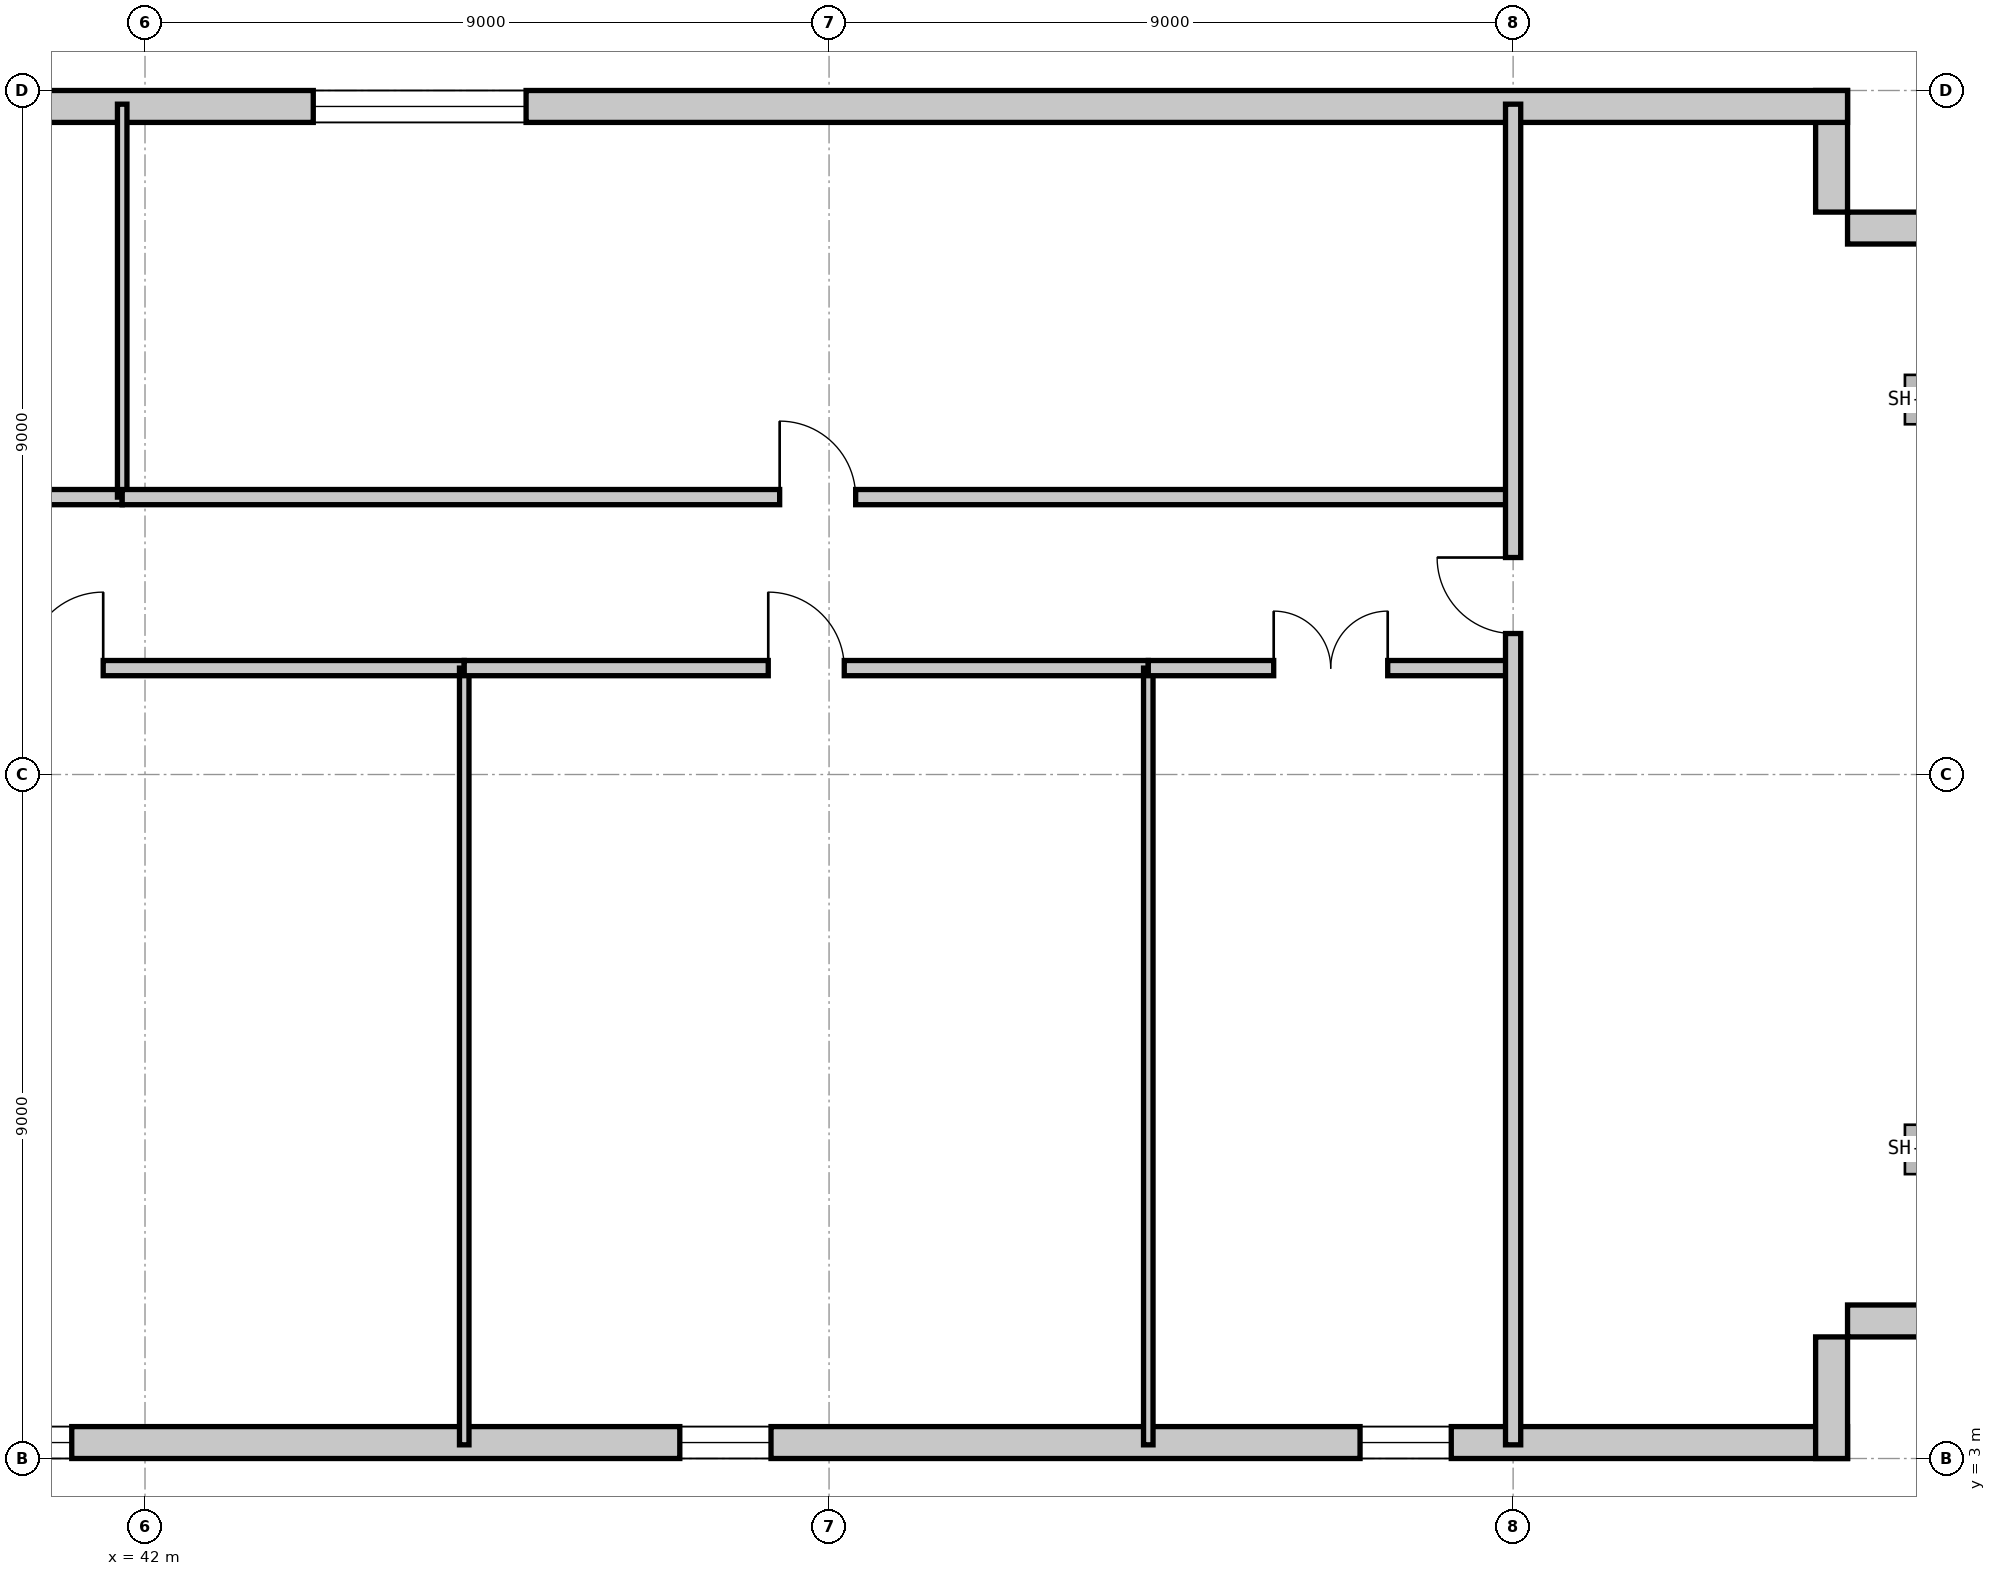
"""IFC4 building model, lengths in metres.
Left out: names, types, materials, properties, quantities, classifications, styles, units other than length and angle.
Written with IfcOpenShell. Run it as: python <this file> out.ifc"""

import sys

from ifc_helpers import new_model, si_unit, direction, frame, frame_2d, origin, origin_2d, place, context, subcontext, project, spatial, rectangle, extrude, element, fill, save


model = new_model("IFC4")
c1 = context("Model", 3, precision=1e-05, world=origin(), true_north=direction((0.0, 1.0)))
c2 = subcontext(c1, "Body", "Model", "MODEL_VIEW")
j1 = project(units=[si_unit("LENGTHUNIT", "METRE"), si_unit("PLANEANGLEUNIT", "RADIAN")], contexts=[c1])
p1 = place(None, origin())
s1 = spatial("IfcSite", under=j1, at=p1, CompositionType="ELEMENT")
p2 = place(p1, origin())
s2 = spatial("IfcBuilding", under=s1, at=p2, CompositionType="ELEMENT")
p3 = place(p2, frame((0.0, 0.0, 38.4)))
s3 = spatial("IfcBuildingStorey", under=s2, at=p3, CompositionType="ELEMENT", Elevation=38.4)
for number, where, z_axis, x_axis in (
    (1, (42.0, 3.0, 0.0), (0.0, 0.0, 1.0), (1.0, 0.0, 0.0)),
    (2, (42.0, 21.0, 0.0), (0.0, 0.0, 1.0), (1.0, 0.0, 0.0)),
    (3, (48.0, 3.0, 0.0), (0.0, 0.0, 1.0), (1.0, 0.0, 0.0)),
    (4, (48.0, 21.0, 0.0), (0.0, 0.0, 1.0), (1.0, 0.0, 0.0)),
    (5, (51.0, 3.0, 0.0), (0.0, 0.0, 1.0), (1.0, 0.0, 0.0)),
    (6, (51.0, 21.0, 0.0), (0.0, 0.0, 1.0), (1.0, 0.0, 0.0)),
    (7, (54.0, 3.0, 0.0), (0.0, 0.0, 1.0), (1.0, 0.0, 0.0)),
    (8, (54.0, 21.0, 0.0), (0.0, 0.0, 1.0), (1.0, 0.0, 0.0)),
    (9, (57.0, 3.0, 0.0), (0.0, 0.0, 1.0), (1.0, 0.0, 0.0)),
    (10, (57.0, 21.0, 0.0), (0.0, 0.0, 1.0), (1.0, 0.0, 0.0)),
    (11, (60.5, 3.0, 0.0), (0.0, 0.0, 1.0), (1.0, 0.0, 0.0)),
    (12, (60.5, 21.0, 0.0), (0.0, 0.0, 1.0), (1.0, 0.0, 0.0)),
    (13, (63.5, 3.0, 0.0), (0.0, 0.0, 1.0), (1.0, 0.0, 0.0)),
    (14, (63.5, 21.0, 0.0), (0.0, 0.0, 1.0), (1.0, 0.0, 0.0)),
):
    element("IfcColumn", number, at=place(p3, frame(where, z_axis=z_axis, x_axis=x_axis)), inside=s3, PredefinedType="COLUMN", context=c2, shape_type="SweptSolid", body=[
        extrude(rectangle(XDim=1.2, YDim=1.2, at=origin_2d()), origin(), (0.0, 0.0, 1.0), 4.2),
    ])
p4 = place(p3, frame((23.9, 3.21, 0.0), z_axis=(0.0, 0.0, 1.0), x_axis=(1.0, 0.0, 0.0)))
e15 = element("IfcWall", 15, at=p4, inside=s3, PredefinedType="STANDARD", context=c2, shape_type="SweptSolid", body=[
    extrude(rectangle(XDim=40.5, YDim=0.42, at=frame_2d((20.25, 0.0))), origin(), (0.0, 0.0, 1.0), 3.98),
])
p5 = place(p4, frame((1.1, 0.0, 0.85)))
e16 = element("IfcOpeningElement", 16, at=p5, cuts=e15, PredefinedType="OPENING", context=c2, shape_type="SweptSolid", body=[
    extrude(rectangle(XDim=1.2, YDim=2.45, at=frame_2d((0.6, 1.225))), frame((0.0, 0.22, 0.0), z_axis=(0.0, -1.0, 0.0), x_axis=(1.0, 0.0, 0.0)), (0.0, 0.0, 1.0), 0.44),
])
p6 = place(p4, frame((5.336, 0.0, 0.85)))
e17 = element("IfcOpeningElement", 17, at=p6, cuts=e15, PredefinedType="OPENING", context=c2, shape_type="SweptSolid", body=[
    extrude(rectangle(XDim=2.8, YDim=2.45, at=frame_2d((1.4, 1.225))), frame((0.0, 0.22, 0.0), z_axis=(0.0, -1.0, 0.0), x_axis=(1.0, 0.0, 0.0)), (0.0, 0.0, 1.0), 0.44),
])
p7 = place(p4, frame((14.336, 0.0, 0.85)))
e18 = element("IfcOpeningElement", 18, at=p7, cuts=e15, PredefinedType="OPENING", context=c2, shape_type="SweptSolid", body=[
    extrude(rectangle(XDim=2.8, YDim=2.45, at=frame_2d((1.4, 1.225))), frame((0.0, 0.22, 0.0), z_axis=(0.0, -1.0, 0.0), x_axis=(1.0, 0.0, 0.0)), (0.0, 0.0, 1.0), 0.44),
])
p8 = place(p4, frame((25.136, 0.0, 0.85)))
e19 = element("IfcOpeningElement", 19, at=p8, cuts=e15, PredefinedType="OPENING", context=c2, shape_type="SweptSolid", body=[
    extrude(rectangle(XDim=1.2, YDim=2.45, at=frame_2d((0.6, 1.225))), frame((0.0, 0.22, 0.0), z_axis=(0.0, -1.0, 0.0), x_axis=(1.0, 0.0, 0.0)), (0.0, 0.0, 1.0), 0.44),
])
p9 = place(p4, frame((34.086, 0.0, 0.85)))
e20 = element("IfcOpeningElement", 20, at=p9, cuts=e15, PredefinedType="OPENING", context=c2, shape_type="SweptSolid", body=[
    extrude(rectangle(XDim=1.2, YDim=2.45, at=frame_2d((0.6, 1.225))), frame((0.0, 0.22, 0.0), z_axis=(0.0, -1.0, 0.0), x_axis=(1.0, 0.0, 0.0)), (0.0, 0.0, 1.0), 0.44),
])
for number, where, z_axis, x_axis in (
    (21, (64.19, 3.0, 0.0), (0.0, 0.0, 1.0), (0.0, 1.0, 0.0)),
    (22, (64.4, 4.81, 0.0), (0.0, 0.0, 1.0), (1.0, 0.0, 0.0)),
    (23, (66.0, 19.19, 0.0), (0.0, 0.0, 1.0), (-1.0, 0.0, 0.0)),
    (24, (64.19, 19.4, 0.0), (0.0, 0.0, 1.0), (0.0, 1.0, 0.0)),
):
    element("IfcWall", number, at=place(p3, frame(where, z_axis=z_axis, x_axis=x_axis)), inside=s3, PredefinedType="STANDARD", context=c2, shape_type="SweptSolid", body=[
        extrude(rectangle(XDim=1.6, YDim=0.42, at=frame_2d((0.8, 0.0))), origin(), (0.0, 0.0, 1.0), 3.98),
    ])
p10 = place(p3, frame((64.4, 20.79, 0.0), z_axis=(0.0, 0.0, 1.0), x_axis=(-1.0, 0.0, 0.0)))
e25 = element("IfcWall", 25, at=p10, inside=s3, PredefinedType="STANDARD", context=c2, shape_type="SweptSolid", body=[
    extrude(rectangle(XDim=40.4, YDim=0.42, at=frame_2d((20.2, 0.0))), origin(), (0.0, 0.0, 1.0), 3.98),
])
p11 = place(p10, frame((26.375, 0.0, 0.85)))
e26 = element("IfcOpeningElement", 26, at=p11, cuts=e25, PredefinedType="OPENING", context=c2, shape_type="SweptSolid", body=[
    extrude(rectangle(XDim=2.8, YDim=2.45, at=frame_2d((1.4, 1.225))), frame((0.0, 0.22, 0.0), z_axis=(0.0, -1.0, 0.0), x_axis=(1.0, 0.0, 0.0)), (0.0, 0.0, 1.0), 0.44),
])
p12 = place(p10, frame((38.222, 0.0, 0.85)))
e27 = element("IfcOpeningElement", 27, at=p12, cuts=e25, PredefinedType="OPENING", context=c2, shape_type="SweptSolid", body=[
    extrude(rectangle(XDim=1.2, YDim=2.45, at=frame_2d((0.6, 1.225))), frame((0.0, 0.22, 0.0), z_axis=(0.0, -1.0, 0.0), x_axis=(1.0, 0.0, 0.0)), (0.0, 0.0, 1.0), 0.44),
])
p13 = place(p10, frame((32.536, 0.0, 0.85)))
e28 = element("IfcOpeningElement", 28, at=p13, cuts=e25, PredefinedType="OPENING", context=c2, shape_type="SweptSolid", body=[
    extrude(rectangle(XDim=2.8, YDim=2.45, at=frame_2d((1.4, 1.225))), frame((0.0, 0.22, 0.0), z_axis=(0.0, -1.0, 0.0), x_axis=(1.0, 0.0, 0.0)), (0.0, 0.0, 1.0), 0.44),
])
p14 = place(p10, frame((17.386, 0.0, 0.85)))
e29 = element("IfcOpeningElement", 29, at=p14, cuts=e25, PredefinedType="OPENING", context=c2, shape_type="SweptSolid", body=[
    extrude(rectangle(XDim=2.8, YDim=2.45, at=frame_2d((1.4, 1.225))), frame((0.0, 0.22, 0.0), z_axis=(0.0, -1.0, 0.0), x_axis=(1.0, 0.0, 0.0)), (0.0, 0.0, 1.0), 0.44),
])
p15 = place(p3, frame((35.7, 13.4, 0.0), z_axis=(0.0, 0.0, 1.0), x_axis=(1.0, 0.0, 0.0)))
e30 = element("IfcWall", 30, at=p15, inside=s3, PredefinedType="PARTITIONING", context=c2, shape_type="SweptSolid", body=[
    extrude(rectangle(XDim=10.5, YDim=0.2, at=frame_2d((5.25, 0.0))), origin(), (0.0, 0.0, 1.0), 3.97),
])
p16 = place(p15, frame((4.75, 0.0, 0.0)))
e31 = element("IfcOpeningElement", 31, at=p16, cuts=e30, PredefinedType="OPENING", context=c2, shape_type="SweptSolid", body=[
    extrude(rectangle(XDim=1.0, YDim=2.15, at=frame_2d((0.5, 1.075))), frame((0.0, 0.11, 0.0), z_axis=(0.0, -1.0, 0.0), x_axis=(1.0, 0.0, 0.0)), (0.0, 0.0, 1.0), 0.22),
])
p17 = place(p3, frame((46.2, 3.18, 0.0), z_axis=(0.0, 0.0, 1.0), x_axis=(0.0, 1.0, 0.0)))
e32 = element("IfcWall", 32, at=p17, inside=s3, PredefinedType="PARTITIONING", context=c2, shape_type="SweptSolid", body=[
    extrude(rectangle(XDim=10.22, YDim=0.125, at=frame_2d((5.11, 0.0))), origin(), (0.0, 0.0, 1.0), 3.97),
])
p18 = place(p3, frame((46.2, 13.4, 0.0), z_axis=(0.0, 0.0, 1.0), x_axis=(1.0, 0.0, 0.0)))
e33 = element("IfcWall", 33, at=p18, inside=s3, PredefinedType="PARTITIONING", context=c2, shape_type="SweptSolid", body=[
    extrude(rectangle(XDim=9.0, YDim=0.2, at=frame_2d((4.5, 0.0))), origin(), (0.0, 0.0, 1.0), 3.97),
])
p19 = place(p18, frame((4.0, 0.0, 0.0)))
e34 = element("IfcOpeningElement", 34, at=p19, cuts=e33, PredefinedType="OPENING", context=c2, shape_type="SweptSolid", body=[
    extrude(rectangle(XDim=1.0, YDim=2.15, at=frame_2d((0.5, 1.075))), frame((0.0, 0.11, 0.0), z_axis=(0.0, -1.0, 0.0), x_axis=(1.0, 0.0, 0.0)), (0.0, 0.0, 1.0), 0.22),
])
p20 = place(p3, frame((55.2, 3.18, 0.0), z_axis=(0.0, 0.0, 1.0), x_axis=(0.0, 1.0, 0.0)))
e35 = element("IfcWall", 35, at=p20, inside=s3, PredefinedType="PARTITIONING", context=c2, shape_type="SweptSolid", body=[
    extrude(rectangle(XDim=10.22, YDim=0.125, at=frame_2d((5.11, 0.0))), origin(), (0.0, 0.0, 1.0), 3.97),
])
p21 = place(p3, frame((55.2, 13.4, 0.0), z_axis=(0.0, 0.0, 1.0), x_axis=(1.0, 0.0, 0.0)))
e36 = element("IfcWall", 36, at=p21, inside=s3, PredefinedType="PARTITIONING", context=c2, shape_type="SweptSolid", body=[
    extrude(rectangle(XDim=4.8, YDim=0.2, at=frame_2d((2.4, 0.0))), origin(), (0.0, 0.0, 1.0), 3.97),
])
p22 = place(p21, frame((1.65, 0.0, 0.0)))
e37 = element("IfcOpeningElement", 37, at=p22, cuts=e36, PredefinedType="OPENING", context=c2, shape_type="SweptSolid", body=[
    extrude(rectangle(XDim=1.5, YDim=2.3, at=frame_2d((0.75, 1.15))), frame((0.0, 0.11, 0.0), z_axis=(0.0, -1.0, 0.0), x_axis=(1.0, 0.0, 0.0)), (0.0, 0.0, 1.0), 0.22),
])
p23 = place(p3, frame((34.2, 15.65, 0.0), z_axis=(0.0, 0.0, 1.0), x_axis=(1.0, 0.0, 0.0)))
e38 = element("IfcWall", 38, at=p23, inside=s3, PredefinedType="PARTITIONING", context=c2, shape_type="SweptSolid", body=[
    extrude(rectangle(XDim=7.5, YDim=0.2, at=frame_2d((3.75, 0.0))), origin(), (0.0, 0.0, 1.0), 3.97),
])
p24 = place(p23, frame((3.0, 0.0, 0.0)))
e39 = element("IfcOpeningElement", 39, at=p24, cuts=e38, PredefinedType="OPENING", context=c2, shape_type="SweptSolid", body=[
    extrude(rectangle(XDim=1.5, YDim=2.3, at=frame_2d((0.75, 1.15))), frame((0.0, 0.11, 0.0), z_axis=(0.0, -1.0, 0.0), x_axis=(1.0, 0.0, 0.0)), (0.0, 0.0, 1.0), 0.22),
])
p25 = place(p3, frame((41.7, 15.65, 0.0), z_axis=(0.0, 0.0, 1.0), x_axis=(0.0, 1.0, 0.0)))
e40 = element("IfcWall", 40, at=p25, inside=s3, PredefinedType="PARTITIONING", context=c2, shape_type="SweptSolid", body=[
    extrude(rectangle(XDim=5.17, YDim=0.125, at=frame_2d((2.585, 0.0))), origin(), (0.0, 0.0, 1.0), 3.97),
])
p26 = place(p3, frame((41.7, 15.65, 0.0), z_axis=(0.0, 0.0, 1.0), x_axis=(1.0, 0.0, 0.0)))
e41 = element("IfcWall", 41, at=p26, inside=s3, PredefinedType="PARTITIONING", context=c2, shape_type="SweptSolid", body=[
    extrude(rectangle(XDim=18.3, YDim=0.2, at=frame_2d((9.15, 0.0))), origin(), (0.0, 0.0, 1.0), 3.97),
])
p27 = place(p26, frame((8.65, 0.0, 0.0)))
e42 = element("IfcOpeningElement", 42, at=p27, cuts=e41, PredefinedType="OPENING", context=c2, shape_type="SweptSolid", body=[
    extrude(rectangle(XDim=1.0, YDim=2.15, at=frame_2d((0.5, 1.075))), frame((0.0, 0.11, 0.0), z_axis=(0.0, -1.0, 0.0), x_axis=(1.0, 0.0, 0.0)), (0.0, 0.0, 1.0), 0.22),
])
p28 = place(p3, frame((60.0, 3.18, 0.0), z_axis=(0.0, 0.0, 1.0), x_axis=(0.0, 1.0, 0.0)))
e43 = element("IfcWall", 43, at=p28, inside=s3, PredefinedType="PARTITIONING", context=c2, shape_type="SweptSolid", body=[
    extrude(rectangle(XDim=17.64, YDim=0.2, at=frame_2d((8.82, 0.0))), origin(), (0.0, 0.0, 1.0), 3.97),
])
p29 = place(p28, frame((10.675, 0.0, 0.0)))
e44 = element("IfcOpeningElement", 44, at=p29, cuts=e43, PredefinedType="OPENING", context=c2, shape_type="SweptSolid", body=[
    extrude(rectangle(XDim=1.0, YDim=2.15, at=frame_2d((0.5, 1.075))), frame((0.0, 0.11, 0.0), z_axis=(0.0, -1.0, 0.0), x_axis=(1.0, 0.0, 0.0)), (0.0, 0.0, 1.0), 0.22),
])
p30 = place(p16, origin())
e45 = element("IfcDoor", 45, at=p30, inside=s3, OperationType="SINGLE_SWING_RIGHT", PredefinedType="DOOR", context=c2, shape_type="SweptSolid", body=[
    extrude(rectangle(XDim=1.0, YDim=2.15, at=frame_2d((0.5, 1.075))), frame((0.0, 0.025, 0.0), z_axis=(0.0, -1.0, 0.0), x_axis=(1.0, 0.0, 0.0)), (0.0, 0.0, 1.0), 0.05),
])
fill(e31, e45)
p31 = place(p19, origin())
e46 = element("IfcDoor", 46, at=p31, inside=s3, OperationType="SINGLE_SWING_LEFT", PredefinedType="DOOR", context=c2, shape_type="SweptSolid", body=[
    extrude(rectangle(XDim=1.0, YDim=2.15, at=frame_2d((0.5, 1.075))), frame((0.0, 0.025, 0.0), z_axis=(0.0, -1.0, 0.0), x_axis=(1.0, 0.0, 0.0)), (0.0, 0.0, 1.0), 0.05),
])
fill(e34, e46)
p32 = place(p22, origin())
e47 = element("IfcDoor", 47, at=p32, inside=s3, OperationType="DOUBLE_DOOR_SINGLE_SWING", PredefinedType="DOOR", context=c2, shape_type="SweptSolid", body=[
    extrude(rectangle(XDim=1.5, YDim=2.3, at=frame_2d((0.75, 1.15))), frame((0.0, 0.025, 0.0), z_axis=(0.0, -1.0, 0.0), x_axis=(1.0, 0.0, 0.0)), (0.0, 0.0, 1.0), 0.05),
])
fill(e37, e47)
p33 = place(p27, origin())
e48 = element("IfcDoor", 48, at=p33, inside=s3, OperationType="SINGLE_SWING_LEFT", PredefinedType="DOOR", context=c2, shape_type="SweptSolid", body=[
    extrude(rectangle(XDim=1.0, YDim=2.15, at=frame_2d((0.5, 1.075))), frame((0.0, 0.025, 0.0), z_axis=(0.0, -1.0, 0.0), x_axis=(1.0, 0.0, 0.0)), (0.0, 0.0, 1.0), 0.05),
])
fill(e42, e48)
p34 = place(p29, origin())
e49 = element("IfcDoor", 49, at=p34, inside=s3, OperationType="SINGLE_SWING_RIGHT", PredefinedType="DOOR", context=c2, shape_type="SweptSolid", body=[
    extrude(rectangle(XDim=1.0, YDim=2.15, at=frame_2d((0.5, 1.075))), frame((0.0, 0.025, 0.0), z_axis=(0.0, -1.0, 0.0), x_axis=(1.0, 0.0, 0.0)), (0.0, 0.0, 1.0), 0.05),
])
fill(e44, e49)
p35 = place(p7, origin())
e50 = element("IfcWindow", 50, at=p35, inside=s3, PartitioningType="SINGLE_PANEL", PredefinedType="WINDOW", context=c2, shape_type="SweptSolid", body=[
    extrude(rectangle(XDim=2.8, YDim=2.45, at=frame_2d((1.4, 1.225))), frame((0.0, 0.11, 0.0), z_axis=(0.0, -1.0, 0.0), x_axis=(1.0, 0.0, 0.0)), (0.0, 0.0, 1.0), 0.06),
])
fill(e18, e50)
p36 = place(p8, origin())
e51 = element("IfcWindow", 51, at=p36, inside=s3, PartitioningType="SINGLE_PANEL", PredefinedType="WINDOW", context=c2, shape_type="SweptSolid", body=[
    extrude(rectangle(XDim=1.2, YDim=2.45, at=frame_2d((0.6, 1.225))), frame((0.0, 0.11, 0.0), z_axis=(0.0, -1.0, 0.0), x_axis=(1.0, 0.0, 0.0)), (0.0, 0.0, 1.0), 0.06),
])
fill(e19, e51)
p37 = place(p9, origin())
e52 = element("IfcWindow", 52, at=p37, inside=s3, PartitioningType="SINGLE_PANEL", PredefinedType="WINDOW", context=c2, shape_type="SweptSolid", body=[
    extrude(rectangle(XDim=1.2, YDim=2.45, at=frame_2d((0.6, 1.225))), frame((0.0, 0.11, 0.0), z_axis=(0.0, -1.0, 0.0), x_axis=(1.0, 0.0, 0.0)), (0.0, 0.0, 1.0), 0.06),
])
fill(e20, e52)
p38 = place(p14, origin())
e53 = element("IfcWindow", 53, at=p38, inside=s3, PartitioningType="SINGLE_PANEL", PredefinedType="WINDOW", context=c2, shape_type="SweptSolid", body=[
    extrude(rectangle(XDim=2.8, YDim=2.45, at=frame_2d((1.4, 1.225))), frame((0.0, 0.11, 0.0), z_axis=(0.0, -1.0, 0.0), x_axis=(1.0, 0.0, 0.0)), (0.0, 0.0, 1.0), 0.06),
])
fill(e29, e53)
save(model, sys.argv[1])
